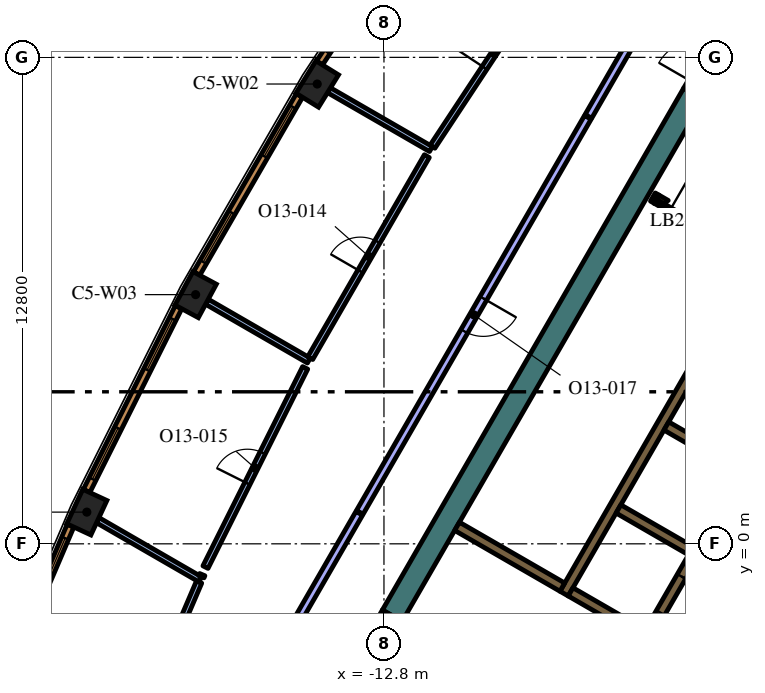
"""IFC4 building model, lengths in metres.
Left out: names, types, materials, properties, quantities, classifications, styles, units other than length and angle.
Written with IfcOpenShell. Run it as: python <this file> out.ifc"""

import sys

from ifc_helpers import new_model, si_unit, direction, frame, frame_2d, origin, origin_2d, place, context, subcontext, project, spatial, polyline, rectangle, outline, extrude, element, fill, save


model = new_model("IFC4")
c1 = context("Model", 3, precision=1e-05, world=origin(), true_north=direction((0.0, 1.0)))
c2 = subcontext(c1, "Body", "Model", "MODEL_VIEW")
j1 = project(units=[si_unit("LENGTHUNIT", "METRE"), si_unit("PLANEANGLEUNIT", "RADIAN")], contexts=[c1])
p1 = place(None, origin())
s1 = spatial("IfcSite", under=j1, at=p1, CompositionType="ELEMENT")
p2 = place(p1, origin())
s2 = spatial("IfcBuilding", under=s1, at=p2, CompositionType="ELEMENT")
p3 = place(p2, frame((0.0, 0.0, 296.4)))
s3 = spatial("IfcBuildingStorey", under=s2, at=p3, CompositionType="ELEMENT", Elevation=296.4)
for number, where, z_axis, x_axis in (
    (1, (-14.556, 12.098, 0.0), (0.0, 0.0, 1.0), (-0.526, -0.851, 0.0)),
    (2, (-17.756, 6.557, 0.0), (0.0, 0.0, 1.0), (-0.474, -0.881, 0.0)),
    (3, (-20.619, 0.834, 0.0), (0.0, 0.0, 1.0), (-0.421, -0.907, 0.0)),
):
    element("IfcColumn", number, at=place(p3, frame(where, z_axis=z_axis, x_axis=x_axis)), inside=s3, PredefinedType="COLUMN", context=c2, shape_type="SweptSolid", body=[
        extrude(rectangle(XDim=1.0, YDim=0.7, at=origin_2d()), origin(), (0.0, 0.0, 1.0), 4.2),
    ])
p4 = place(p3, frame((-12.582, -1.892, 0.0), z_axis=(0.0, 0.0, 1.0), x_axis=(0.500003640647, 0.866023301845, 0.0)))
e4 = element("IfcWall", 4, at=p4, inside=s3, PredefinedType="SOLIDWALL", context=c2, shape_type="SweptSolid", body=[
    extrude(rectangle(XDim=15.858, YDim=0.6, at=frame_2d((7.929, 0.0))), origin(), (0.0, 0.0, 1.0), 4.2),
])
p5 = place(p3, frame((-8.06, -1.311, 0.0), z_axis=(0.0, 0.0, 1.0), x_axis=(0.50000273126, 0.866023826885, 0.0)))
e5 = element("IfcWall", 5, at=p5, inside=s3, PredefinedType="SOLIDWALL", context=c2, shape_type="SweptSolid", body=[
    extrude(rectangle(XDim=10.33, YDim=0.25, at=frame_2d((5.165, 0.0))), origin(), (0.0, 0.0, 1.0), 4.2),
])
for number, where, z_axis, x_axis in (
    (6, (-5.369, 3.1, 0.0), (0.0, 0.0, 1.0), (0.866, -0.5, 0.0)),
    (7, (-4.724, -0.182, 0.0), (0.0, 0.0, 1.0), (-0.866, 0.5, 0.0)),
):
    element("IfcWall", number, at=place(p3, frame(where, z_axis=z_axis, x_axis=x_axis)), inside=s3, PredefinedType="SOLIDWALL", context=c2, shape_type="SweptSolid", body=[
        extrude(rectangle(XDim=2.2, YDim=0.25, at=frame_2d((1.1, 0.0))), origin(), (0.0, 0.0, 1.0), 4.2),
    ])
p6 = place(p3, frame((-7.889, -1.265, 0.0), z_axis=(0.0, 0.0, 1.0), x_axis=(0.865986741702, -0.500066958712, 0.0)))
e8 = element("IfcWall", 8, at=p6, inside=s3, PredefinedType="SOLIDWALL", context=c2, shape_type="SweptSolid", body=[
    extrude(rectangle(XDim=1.738, YDim=0.25, at=frame_2d((0.869, 0.0))), origin(), (0.0, 0.0, 1.0), 4.2),
])
p7 = place(p3, frame((-8.106, -1.14, 0.0), z_axis=(0.0, 0.0, 1.0), x_axis=(-0.866008981251, 0.500028443584, 0.0)))
e9 = element("IfcWall", 9, at=p7, inside=s3, PredefinedType="SOLIDWALL", context=c2, shape_type="SweptSolid", body=[
    extrude(rectangle(XDim=3.2, YDim=0.25, at=frame_2d((1.6, 0.0))), origin(), (0.0, 0.0, 1.0), 4.2),
])
p8 = place(p3, frame((-5.725, 9.125, 0.0), z_axis=(0.0, 0.0, 1.0), x_axis=(0.866185586049, -0.49972245349, 0.0)))
e10 = element("IfcWall", 10, at=p8, inside=s3, PredefinedType="SOLIDWALL", context=c2, shape_type="SweptSolid", body=[
    extrude(rectangle(XDim=0.11, YDim=0.25, at=frame_2d((0.055, 0.0))), origin(), (0.0, 0.0, 1.0), 4.2),
])
p9 = place(p3, origin())
e11 = element("IfcWall", 11, at=p9, inside=s3, PredefinedType="SOLIDWALL", context=c2, shape_type="SweptSolid", body=[
    extrude(outline(polyline([(-5.689, 8.96), (-5.69, 8.961), (-5.565, 9.177), (-5.319, 9.035), (-5.335, 9.026), (-5.351, 9.015), (-5.366, 9.002), (-5.379, 8.988), (-5.392, 8.972), (-5.402, 8.956), (-5.412, 8.939), (-5.629, 9.064), (-5.629, 9.064), (-5.689, 8.96)])), origin(), (0.0, 0.0, 1.0), 4.2),
])
p10 = place(p3, frame((-0.898, 6.194, 0.0), z_axis=(0.0, 0.0, 1.0), x_axis=(-0.499996202215, -0.866027596426, 0.0)))
e12 = element("IfcWall", 12, at=p10, inside=s3, PredefinedType="SOLIDWALL", context=c2, shape_type="SweptSolid", body=[
    extrude(rectangle(XDim=9.83, YDim=0.25, at=frame_2d((4.915, 0.0))), origin(), (0.0, 0.0, 1.0), 4.2),
])
p11 = place(p10, frame((0.585, 0.0, 0.0)))
e13 = element("IfcOpeningElement", 13, at=p11, cuts=e12, PredefinedType="OPENING", context=c2, shape_type="SweptSolid", body=[
    extrude(rectangle(XDim=1.1, YDim=2.1, at=frame_2d((0.55, 1.05))), frame((0.0, 0.135, 0.0), z_axis=(0.0, -1.0, 0.0), x_axis=(1.0, 0.0, 0.0)), (0.0, 0.0, 1.0), 0.27),
])
p12 = place(p10, frame((3.105, 0.0, 0.0)))
e14 = element("IfcOpeningElement", 14, at=p12, cuts=e12, PredefinedType="OPENING", context=c2, shape_type="SweptSolid", body=[
    extrude(rectangle(XDim=1.1, YDim=2.1, at=frame_2d((0.55, 1.05))), frame((0.0, 0.135, 0.0), z_axis=(0.0, -1.0, 0.0), x_axis=(1.0, 0.0, 0.0)), (0.0, 0.0, 1.0), 0.27),
])
p13 = place(p10, frame((5.625, 0.0, 0.0)))
e15 = element("IfcOpeningElement", 15, at=p13, cuts=e12, PredefinedType="OPENING", context=c2, shape_type="SweptSolid", body=[
    extrude(rectangle(XDim=1.1, YDim=2.1, at=frame_2d((0.55, 1.05))), frame((0.0, 0.135, 0.0), z_axis=(0.0, -1.0, 0.0), x_axis=(1.0, 0.0, 0.0)), (0.0, 0.0, 1.0), 0.27),
])
p14 = place(p10, frame((8.145, 0.0, 0.0)))
e16 = element("IfcOpeningElement", 16, at=p14, cuts=e12, PredefinedType="OPENING", context=c2, shape_type="SweptSolid", body=[
    extrude(rectangle(XDim=1.1, YDim=2.1, at=frame_2d((0.55, 1.05))), frame((0.0, 0.135, 0.0), z_axis=(0.0, -1.0, 0.0), x_axis=(1.0, 0.0, 0.0)), (0.0, 0.0, 1.0), 0.27),
])
p15 = place(p3, frame((-5.659, 9.012, 0.0), z_axis=(0.0, 0.0, 1.0), x_axis=(0.866009402589, -0.500027713859, 0.0)))
e17 = element("IfcWall", 17, at=p15, inside=s3, PredefinedType="PARTITIONING", context=c2, shape_type="SweptSolid", body=[
    extrude(rectangle(XDim=2.1, YDim=0.12, at=frame_2d((1.05, 0.0))), origin(), (0.0, 0.0, 1.0), 3.55),
])
p16 = place(p15, frame((0.45, 0.0, 0.0)))
e18 = element("IfcOpeningElement", 18, at=p16, cuts=e17, PredefinedType="OPENING", context=c2, shape_type="SweptSolid", body=[
    extrude(rectangle(XDim=1.2, YDim=2.1, at=frame_2d((0.6, 1.05))), frame((0.0, 0.07, 0.0), z_axis=(0.0, -1.0, 0.0), x_axis=(1.0, 0.0, 0.0)), (0.0, 0.0, 1.0), 0.14),
])
p17 = place(p3, frame((-4.652, 11.842, 0.0), z_axis=(0.0, 0.0, 1.0), x_axis=(0.500062241894, 0.865989465428, 0.0)))
e19 = element("IfcWall", 19, at=p17, inside=s3, PredefinedType="SOLIDWALL", context=c2, shape_type="SweptSolid", body=[
    extrude(rectangle(XDim=1.7, YDim=0.6, at=frame_2d((0.85, 0.0))), origin(), (0.0, 0.0, 1.0), 4.2),
])
p18 = place(p17, frame((0.25, 0.0, 0.0)))
e20 = element("IfcOpeningElement", 20, at=p18, cuts=e19, PredefinedType="OPENING", context=c2, shape_type="SweptSolid", body=[
    extrude(rectangle(XDim=1.2, YDim=2.1, at=frame_2d((0.6, 1.05))), frame((0.0, 0.31, 0.0), z_axis=(0.0, -1.0, 0.0), x_axis=(1.0, 0.0, 0.0)), (0.0, 0.0, 1.0), 0.62),
])
p19 = place(p3, frame((-13.432, -3.364, 0.0), z_axis=(0.0, 0.0, 1.0), x_axis=(0.500062241894, 0.865989465428, 0.0)))
e21 = element("IfcWall", 21, at=p19, inside=s3, PredefinedType="SOLIDWALL", context=c2, shape_type="SweptSolid", body=[
    extrude(rectangle(XDim=1.7, YDim=0.6, at=frame_2d((0.85, 0.0))), origin(), (0.0, 0.0, 1.0), 4.2),
])
p20 = place(p19, frame((0.25, 0.0, 0.0)))
e22 = element("IfcOpeningElement", 22, at=p20, cuts=e21, PredefinedType="OPENING", context=c2, shape_type="SweptSolid", body=[
    extrude(rectangle(XDim=1.2, YDim=2.1, at=frame_2d((0.6, 1.05))), frame((0.0, 0.31, 0.0), z_axis=(0.0, -1.0, 0.0), x_axis=(1.0, 0.0, 0.0)), (0.0, 0.0, 1.0), 0.62),
])
p21 = place(p3, frame((-11.564, 10.387, 0.0), z_axis=(0.0, 0.0, 1.0), x_axis=(-0.86604641216, 0.499963610661, 0.0)))
e23 = element("IfcWall", 23, at=p21, inside=s3, PredefinedType="PARTITIONING", context=c2, shape_type="SweptSolid", body=[
    extrude(rectangle(XDim=3.096, YDim=0.15, at=frame_2d((1.548, 0.0))), origin(), (0.0, 0.0, 1.0), 3.55),
])
p22 = place(p3, frame((-11.523, 10.449, 0.0), z_axis=(0.0, 0.0, 1.0), x_axis=(0.550751709023, 0.834669129061, 0.0)))
e24 = element("IfcWall", 24, at=p22, inside=s3, PredefinedType="PARTITIONING", context=c2, shape_type="SweptSolid", body=[
    extrude(rectangle(XDim=5.788, YDim=0.15, at=frame_2d((2.894, 0.0))), origin(), (0.0, 0.0, 1.0), 3.55),
])
p23 = place(p22, frame((2.488, 0.0, 0.0)))
e25 = element("IfcOpeningElement", 25, at=p23, cuts=e24, PredefinedType="OPENING", context=c2, shape_type="SweptSolid", body=[
    extrude(rectangle(XDim=0.9, YDim=2.1, at=frame_2d((0.45, 1.05))), frame((0.0, 0.085, 0.0), z_axis=(0.0, -1.0, 0.0), x_axis=(1.0, 0.0, 0.0)), (0.0, 0.0, 1.0), 0.17),
])
p24 = place(p3, frame((-14.777, 4.822, 0.0), z_axis=(0.0, 0.0, 1.0), x_axis=(-0.865992557167, 0.500056887695, 0.0)))
e26 = element("IfcWall", 26, at=p24, inside=s3, PredefinedType="PARTITIONING", context=c2, shape_type="SweptSolid", body=[
    extrude(rectangle(XDim=3.096, YDim=0.15, at=frame_2d((1.548, 0.0))), origin(), (0.0, 0.0, 1.0), 3.55),
])
p25 = place(p3, frame((-14.74, 4.887, 0.0), z_axis=(0.0, 0.0, 1.0), x_axis=(0.500007141444, 0.86602128063, 0.0)))
e27 = element("IfcWall", 27, at=p25, inside=s3, PredefinedType="PARTITIONING", context=c2, shape_type="SweptSolid", body=[
    extrude(rectangle(XDim=6.137, YDim=0.15, at=frame_2d((3.068, 0.0))), origin(), (0.0, 0.0, 1.0), 3.55),
])
p26 = place(p25, frame((2.637, 0.0, 0.0)))
e28 = element("IfcOpeningElement", 28, at=p26, cuts=e27, PredefinedType="OPENING", context=c2, shape_type="SweptSolid", body=[
    extrude(rectangle(XDim=0.9, YDim=2.1, at=frame_2d((0.45, 1.05))), frame((0.0, 0.085, 0.0), z_axis=(0.0, -1.0, 0.0), x_axis=(1.0, 0.0, 0.0)), (0.0, 0.0, 1.0), 0.17),
])
p27 = place(p3, frame((-17.635, -0.936, 0.0), z_axis=(0.0, 0.0, 1.0), x_axis=(-0.866044607523, 0.499966736674, 0.0)))
e29 = element("IfcWall", 29, at=p27, inside=s3, PredefinedType="PARTITIONING", context=c2, shape_type="SweptSolid", body=[
    extrude(rectangle(XDim=3.115, YDim=0.15, at=frame_2d((1.557, 0.0))), origin(), (0.0, 0.0, 1.0), 3.55),
])
p28 = place(p3, frame((-17.497, -0.613, 0.0), z_axis=(0.0, 0.0, 1.0), x_axis=(0.447480081559, 0.89429389834, 0.0)))
e30 = element("IfcWall", 30, at=p28, inside=s3, PredefinedType="PARTITIONING", context=c2, shape_type="SweptSolid", body=[
    extrude(rectangle(XDim=5.863, YDim=0.15, at=frame_2d((2.931, 0.0))), origin(), (0.0, 0.0, 1.0), 3.55),
])
p29 = place(p28, frame((2.463, 0.0, 0.0)))
e31 = element("IfcOpeningElement", 31, at=p29, cuts=e30, PredefinedType="OPENING", context=c2, shape_type="SweptSolid", body=[
    extrude(rectangle(XDim=0.9, YDim=2.1, at=frame_2d((0.45, 1.05))), frame((0.0, 0.085, 0.0), z_axis=(0.0, -1.0, 0.0), x_axis=(1.0, 0.0, 0.0)), (0.0, 0.0, 1.0), 0.17),
])
p30 = place(p3, frame((-17.581, -0.81, 0.0), z_axis=(0.0, 0.0, 1.0), x_axis=(-0.390033474923, -0.92080067791, 0.0)))
e32 = element("IfcWall", 32, at=p30, inside=s3, PredefinedType="PARTITIONING", context=c2, shape_type="SweptSolid", body=[
    extrude(rectangle(XDim=0.061, YDim=0.15, at=frame_2d((0.03, 0.0))), origin(), (0.0, 0.0, 1.0), 3.55),
])
p31 = place(p3, frame((-19.639, -5.62, 0.0), z_axis=(0.0, 0.0, 1.0), x_axis=(0.393349802257, 0.919388891092, 0.0)))
e33 = element("IfcWall", 33, at=p31, inside=s3, PredefinedType="PARTITIONING", context=c2, shape_type="SweptSolid", body=[
    extrude(rectangle(XDim=5.019, YDim=0.15, at=frame_2d((2.51, 0.0))), origin(), (0.0, 0.0, 1.0), 3.55),
])
p32 = place(p31, frame((2.019, 0.0, 0.0)))
e34 = element("IfcOpeningElement", 34, at=p32, cuts=e33, PredefinedType="OPENING", context=c2, shape_type="SweptSolid", body=[
    extrude(rectangle(XDim=0.9, YDim=2.1, at=frame_2d((0.45, 1.05))), frame((0.0, 0.085, 0.0), z_axis=(0.0, -1.0, 0.0), x_axis=(1.0, 0.0, 0.0)), (0.0, 0.0, 1.0), 0.17),
])
p33 = place(p3, frame((-7.436, 11.221, 0.0), z_axis=(0.0, 0.0, 1.0), x_axis=(-0.49999894854, -0.866026010844, 0.0)))
e35 = element("IfcWall", 35, at=p33, inside=s3, PredefinedType="PARTITIONING", context=c2, shape_type="SweptSolid", body=[
    extrude(rectangle(XDim=12.0, YDim=0.2, at=frame_2d((6.0, 0.0))), origin(), (0.0, 0.0, 1.0), 3.55),
])
p34 = place(p33, frame((5.5, 0.0, 0.0)))
e36 = element("IfcOpeningElement", 36, at=p34, cuts=e35, PredefinedType="OPENING", context=c2, shape_type="SweptSolid", body=[
    extrude(rectangle(XDim=1.0, YDim=2.1, at=frame_2d((0.5, 1.05))), frame((0.0, 0.11, 0.0), z_axis=(0.0, -1.0, 0.0), x_axis=(1.0, 0.0, 0.0)), (0.0, 0.0, 1.0), 0.22),
])
p35 = place(p3, frame((-13.451, 0.803, 0.0), z_axis=(0.0, 0.0, 1.0), x_axis=(-0.499979102685, -0.866037468519, 0.0)))
e37 = element("IfcWall", 37, at=p35, inside=s3, PredefinedType="PARTITIONING", context=c2, shape_type="SweptSolid", body=[
    extrude(rectangle(XDim=7.795, YDim=0.2, at=frame_2d((3.897, 0.0))), origin(), (0.0, 0.0, 1.0), 3.55),
])
p36 = place(p3, frame((-3.306, 18.374, 0.0), z_axis=(0.0, 0.0, 1.0), x_axis=(-0.499999798456, -0.866025520146, 0.0)))
e38 = element("IfcWall", 38, at=p36, inside=s3, PredefinedType="PARTITIONING", context=c2, shape_type="SweptSolid", body=[
    extrude(rectangle(XDim=8.229, YDim=0.2, at=frame_2d((4.115, 0.0))), origin(), (0.0, 0.0, 1.0), 3.55),
])
p37 = place(p3, frame((-11.518, 17.166, 0.0), z_axis=(0.0, 0.0, 1.0), x_axis=(-0.550744054781, -0.83467417962, 0.0)))
e39 = element("IfcWall", 39, at=p37, inside=s3, PredefinedType="SOLIDWALL", context=c2, shape_type="SweptSolid", body=[
    extrude(rectangle(XDim=5.406, YDim=0.19, at=frame_2d((2.703, 0.0))), origin(), (0.0, 0.0, 1.0), 3.95),
])
p38 = place(p37, frame((0.346, 0.0, 0.6)))
e40 = element("IfcOpeningElement", 40, at=p38, cuts=e39, PredefinedType="OPENING", context=c2, shape_type="SweptSolid", body=[
    extrude(rectangle(XDim=1.5, YDim=2.85, at=frame_2d((0.75, 1.425))), frame((0.0, 0.105, 0.0), z_axis=(0.0, -1.0, 0.0), x_axis=(1.0, 0.0, 0.0)), (0.0, 0.0, 1.0), 0.21),
])
p39 = place(p37, frame((3.559, 0.0, 0.6)))
e41 = element("IfcOpeningElement", 41, at=p39, cuts=e39, PredefinedType="OPENING", context=c2, shape_type="SweptSolid", body=[
    extrude(rectangle(XDim=1.5, YDim=2.85, at=frame_2d((0.75, 1.425))), frame((0.0, 0.105, 0.0), z_axis=(0.0, -1.0, 0.0), x_axis=(1.0, 0.0, 0.0)), (0.0, 0.0, 1.0), 0.21),
])
p40 = place(p3, frame((-15.025, 11.796, 0.0), z_axis=(0.0, 0.0, 1.0), x_axis=(-0.500024767483, -0.866011103799, 0.0)))
e42 = element("IfcWall", 42, at=p40, inside=s3, PredefinedType="SOLIDWALL", context=c2, shape_type="SweptSolid", body=[
    extrude(rectangle(XDim=5.406, YDim=0.19, at=frame_2d((2.703, 0.0))), origin(), (0.0, 0.0, 1.0), 3.95),
])
p41 = place(p40, frame((0.346, 0.0, 0.6)))
e43 = element("IfcOpeningElement", 43, at=p41, cuts=e42, PredefinedType="OPENING", context=c2, shape_type="SweptSolid", body=[
    extrude(rectangle(XDim=1.5, YDim=2.85, at=frame_2d((0.75, 1.425))), frame((0.0, 0.105, 0.0), z_axis=(0.0, -1.0, 0.0), x_axis=(1.0, 0.0, 0.0)), (0.0, 0.0, 1.0), 0.21),
])
p42 = place(p40, frame((3.559, 0.0, 0.6)))
e44 = element("IfcOpeningElement", 44, at=p42, cuts=e42, PredefinedType="OPENING", context=c2, shape_type="SweptSolid", body=[
    extrude(rectangle(XDim=1.5, YDim=2.85, at=frame_2d((0.75, 1.425))), frame((0.0, 0.105, 0.0), z_axis=(0.0, -1.0, 0.0), x_axis=(1.0, 0.0, 0.0)), (0.0, 0.0, 1.0), 0.21),
])
p43 = place(p3, frame((-18.206, 6.227, 0.0), z_axis=(0.0, 0.0, 1.0), x_axis=(-0.447484531401, -0.894291671747, 0.0)))
e45 = element("IfcWall", 45, at=p43, inside=s3, PredefinedType="SOLIDWALL", context=c2, shape_type="SweptSolid", body=[
    extrude(rectangle(XDim=5.406, YDim=0.19, at=frame_2d((2.703, 0.0))), origin(), (0.0, 0.0, 1.0), 3.95),
])
p44 = place(p43, frame((0.346, 0.0, 0.6)))
e46 = element("IfcOpeningElement", 46, at=p44, cuts=e45, PredefinedType="OPENING", context=c2, shape_type="SweptSolid", body=[
    extrude(rectangle(XDim=1.5, YDim=2.85, at=frame_2d((0.75, 1.425))), frame((0.0, 0.105, 0.0), z_axis=(0.0, -1.0, 0.0), x_axis=(1.0, 0.0, 0.0)), (0.0, 0.0, 1.0), 0.21),
])
p45 = place(p43, frame((3.559, 0.0, 0.6)))
e47 = element("IfcOpeningElement", 47, at=p45, cuts=e45, PredefinedType="OPENING", context=c2, shape_type="SweptSolid", body=[
    extrude(rectangle(XDim=1.5, YDim=2.85, at=frame_2d((0.75, 1.425))), frame((0.0, 0.105, 0.0), z_axis=(0.0, -1.0, 0.0), x_axis=(1.0, 0.0, 0.0)), (0.0, 0.0, 1.0), 0.21),
])
p46 = place(p3, frame((-21.049, 0.478, 0.0), z_axis=(0.0, 0.0, 1.0), x_axis=(-0.393347848476, -0.919389726992, 0.0)))
e48 = element("IfcWall", 48, at=p46, inside=s3, PredefinedType="SOLIDWALL", context=c2, shape_type="SweptSolid", body=[
    extrude(rectangle(XDim=5.415, YDim=0.19, at=frame_2d((2.708, 0.0))), origin(), (0.0, 0.0, 1.0), 3.95),
])
p47 = place(p46, frame((0.357, 0.0, 0.6)))
e49 = element("IfcOpeningElement", 49, at=p47, cuts=e48, PredefinedType="OPENING", context=c2, shape_type="SweptSolid", body=[
    extrude(rectangle(XDim=1.5, YDim=2.85, at=frame_2d((0.75, 1.425))), frame((0.0, 0.105, 0.0), z_axis=(0.0, -1.0, 0.0), x_axis=(1.0, 0.0, 0.0)), (0.0, 0.0, 1.0), 0.21),
])
p48 = place(p46, frame((3.593, 0.0, 0.6)))
e50 = element("IfcOpeningElement", 50, at=p48, cuts=e48, PredefinedType="OPENING", context=c2, shape_type="SweptSolid", body=[
    extrude(rectangle(XDim=1.5, YDim=2.85, at=frame_2d((0.75, 1.425))), frame((0.0, 0.105, 0.0), z_axis=(0.0, -1.0, 0.0), x_axis=(1.0, 0.0, 0.0)), (0.0, 0.0, 1.0), 0.21),
])
p49 = place(p14, origin())
e51 = element("IfcDoor", 51, at=p49, inside=s3, OperationType="DOUBLE_DOOR_SLIDING", PredefinedType="DOOR", context=c2, shape_type="SweptSolid", body=[
    extrude(rectangle(XDim=1.1, YDim=2.1, at=frame_2d((0.55, 1.05))), frame((0.0, 0.025, 0.0), z_axis=(0.0, -1.0, 0.0), x_axis=(1.0, 0.0, 0.0)), (0.0, 0.0, 1.0), 0.05),
])
fill(e16, e51)
p50 = place(p16, origin())
e52 = element("IfcDoor", 52, at=p50, inside=s3, OperationType="SINGLE_SWING_LEFT", PredefinedType="DOOR", context=c2, shape_type="SweptSolid", body=[
    extrude(rectangle(XDim=1.2, YDim=2.1, at=frame_2d((0.6, 1.05))), frame((0.0, 0.025, 0.0), z_axis=(0.0, -1.0, 0.0), x_axis=(1.0, 0.0, 0.0)), (0.0, 0.0, 1.0), 0.05),
])
fill(e18, e52)
p51 = place(p23, origin())
e53 = element("IfcDoor", 53, at=p51, inside=s3, OperationType="SINGLE_SWING_RIGHT", PredefinedType="DOOR", context=c2, shape_type="SweptSolid", body=[
    extrude(rectangle(XDim=0.9, YDim=2.1, at=frame_2d((0.45, 1.05))), frame((0.0, 0.025, 0.0), z_axis=(0.0, -1.0, 0.0), x_axis=(1.0, 0.0, 0.0)), (0.0, 0.0, 1.0), 0.05),
])
fill(e25, e53)
p52 = place(p26, origin())
e54 = element("IfcDoor", 54, at=p52, inside=s3, OperationType="SINGLE_SWING_RIGHT", PredefinedType="DOOR", context=c2, shape_type="SweptSolid", body=[
    extrude(rectangle(XDim=0.9, YDim=2.1, at=frame_2d((0.45, 1.05))), frame((0.0, 0.025, 0.0), z_axis=(0.0, -1.0, 0.0), x_axis=(1.0, 0.0, 0.0)), (0.0, 0.0, 1.0), 0.05),
])
fill(e28, e54)
p53 = place(p29, origin())
e55 = element("IfcDoor", 55, at=p53, inside=s3, OperationType="SINGLE_SWING_LEFT", PredefinedType="DOOR", context=c2, shape_type="SweptSolid", body=[
    extrude(rectangle(XDim=0.9, YDim=2.1, at=frame_2d((0.45, 1.05))), frame((0.0, 0.025, 0.0), z_axis=(0.0, -1.0, 0.0), x_axis=(1.0, 0.0, 0.0)), (0.0, 0.0, 1.0), 0.05),
])
fill(e31, e55)
p54 = place(p34, origin())
e56 = element("IfcDoor", 56, at=p54, inside=s3, OperationType="SINGLE_SWING_RIGHT", PredefinedType="DOOR", context=c2, shape_type="SweptSolid", body=[
    extrude(rectangle(XDim=1.0, YDim=2.1, at=frame_2d((0.5, 1.05))), frame((0.0, 0.025, 0.0), z_axis=(0.0, -1.0, 0.0), x_axis=(1.0, 0.0, 0.0)), (0.0, 0.0, 1.0), 0.05),
])
fill(e36, e56)
p55 = place(p39, origin())
e57 = element("IfcWindow", 57, at=p55, inside=s3, PartitioningType="SINGLE_PANEL", PredefinedType="WINDOW", context=c2, shape_type="SweptSolid", body=[
    extrude(rectangle(XDim=1.5, YDim=2.85, at=frame_2d((0.75, 1.425))), frame((0.0, 0.045, 0.0), z_axis=(0.0, -1.0, 0.0), x_axis=(1.0, 0.0, 0.0)), (0.0, 0.0, 1.0), 0.06),
])
fill(e41, e57)
p56 = place(p41, origin())
e58 = element("IfcWindow", 58, at=p56, inside=s3, PartitioningType="SINGLE_PANEL", PredefinedType="WINDOW", context=c2, shape_type="SweptSolid", body=[
    extrude(rectangle(XDim=1.5, YDim=2.85, at=frame_2d((0.75, 1.425))), frame((0.0, 0.045, 0.0), z_axis=(0.0, -1.0, 0.0), x_axis=(1.0, 0.0, 0.0)), (0.0, 0.0, 1.0), 0.06),
])
fill(e43, e58)
p57 = place(p42, origin())
e59 = element("IfcWindow", 59, at=p57, inside=s3, PartitioningType="SINGLE_PANEL", PredefinedType="WINDOW", context=c2, shape_type="SweptSolid", body=[
    extrude(rectangle(XDim=1.5, YDim=2.85, at=frame_2d((0.75, 1.425))), frame((0.0, 0.045, 0.0), z_axis=(0.0, -1.0, 0.0), x_axis=(1.0, 0.0, 0.0)), (0.0, 0.0, 1.0), 0.06),
])
fill(e44, e59)
p58 = place(p44, origin())
e60 = element("IfcWindow", 60, at=p58, inside=s3, PartitioningType="SINGLE_PANEL", PredefinedType="WINDOW", context=c2, shape_type="SweptSolid", body=[
    extrude(rectangle(XDim=1.5, YDim=2.85, at=frame_2d((0.75, 1.425))), frame((0.0, 0.045, 0.0), z_axis=(0.0, -1.0, 0.0), x_axis=(1.0, 0.0, 0.0)), (0.0, 0.0, 1.0), 0.06),
])
fill(e46, e60)
p59 = place(p45, origin())
e61 = element("IfcWindow", 61, at=p59, inside=s3, PartitioningType="SINGLE_PANEL", PredefinedType="WINDOW", context=c2, shape_type="SweptSolid", body=[
    extrude(rectangle(XDim=1.5, YDim=2.85, at=frame_2d((0.75, 1.425))), frame((0.0, 0.045, 0.0), z_axis=(0.0, -1.0, 0.0), x_axis=(1.0, 0.0, 0.0)), (0.0, 0.0, 1.0), 0.06),
])
fill(e47, e61)
p60 = place(p47, origin())
e62 = element("IfcWindow", 62, at=p60, inside=s3, PartitioningType="SINGLE_PANEL", PredefinedType="WINDOW", context=c2, shape_type="SweptSolid", body=[
    extrude(rectangle(XDim=1.5, YDim=2.85, at=frame_2d((0.75, 1.425))), frame((0.0, 0.045, 0.0), z_axis=(0.0, -1.0, 0.0), x_axis=(1.0, 0.0, 0.0)), (0.0, 0.0, 1.0), 0.06),
])
fill(e49, e62)
save(model, sys.argv[1])
